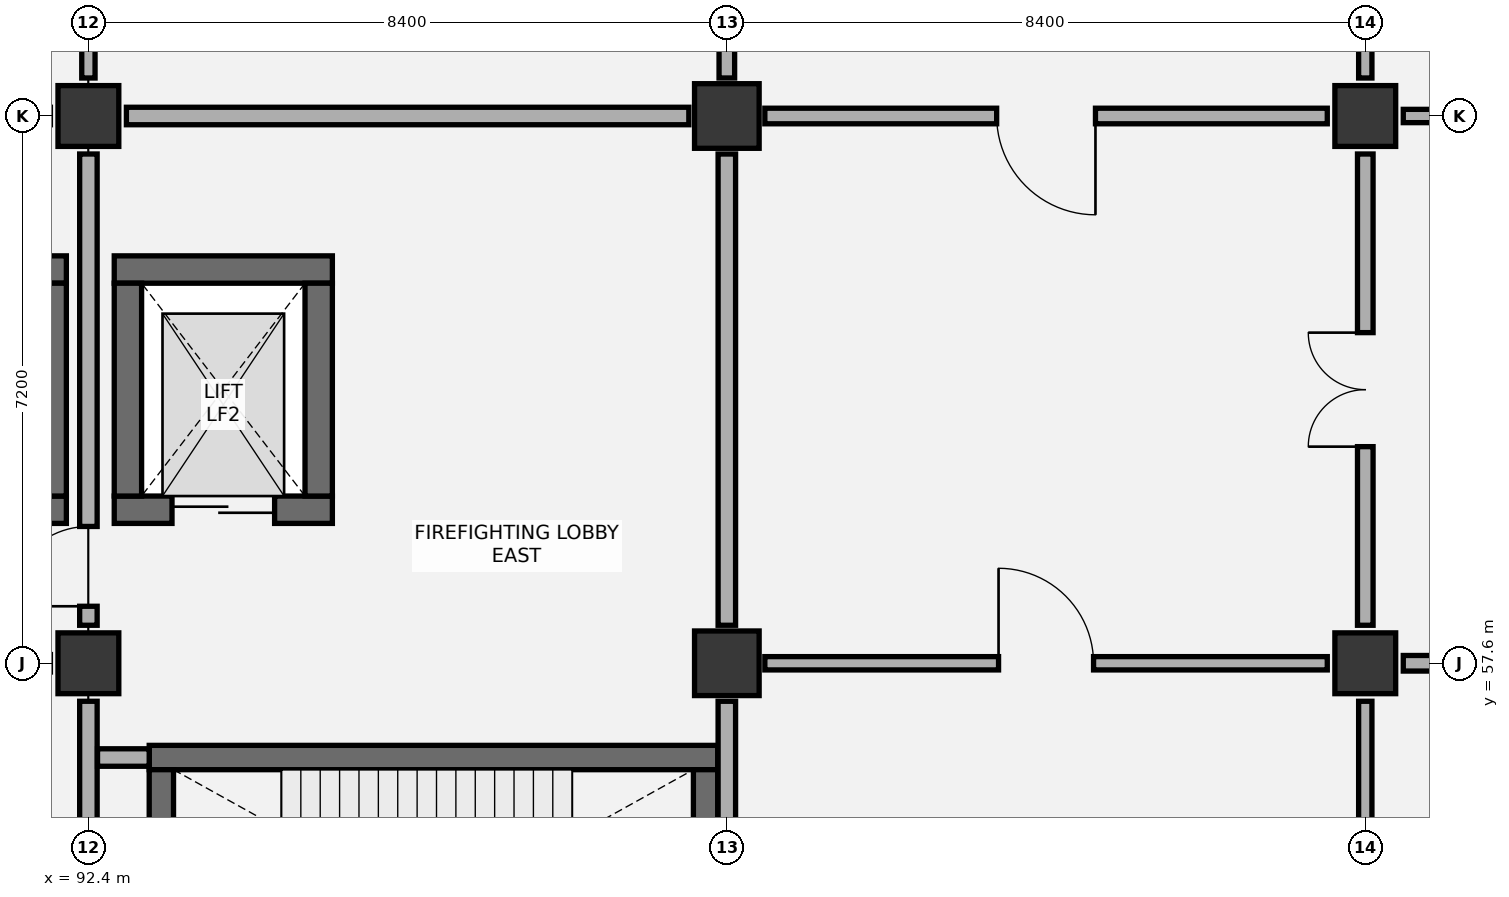
"""IFC4 building model, lengths in metres.
Left out: names, types, materials, properties, quantities, classifications, styles, units other than length and angle.
Written with IfcOpenShell. Run it as: python <this file> out.ifc"""

import sys

from ifc_helpers import new_model, si_unit, direction, frame, frame_2d, origin, origin_2d, place, context, subcontext, project, spatial, rectangle, extrude, element, fill, save


model = new_model("IFC4")
c1 = context("Model", 3, precision=1e-05, world=origin(), true_north=direction((0.0, 1.0)))
c2 = subcontext(c1, "Body", "Model", "MODEL_VIEW")
j1 = project(units=[si_unit("LENGTHUNIT", "METRE"), si_unit("PLANEANGLEUNIT", "RADIAN")], contexts=[c1])
p1 = place(None, origin())
s1 = spatial("IfcSite", under=j1, at=p1, CompositionType="ELEMENT")
p2 = place(p1, origin())
s2 = spatial("IfcBuilding", under=s1, at=p2, CompositionType="ELEMENT")
p3 = place(p2, frame((0.0, 0.0, 16.8)))
s3 = spatial("IfcBuildingStorey", under=s2, at=p3, CompositionType="ELEMENT", Elevation=16.8)
for number, where, z_axis, x_axis in (
    (1, (92.4, 57.6, 0.0), (0.0, 0.0, 1.0), (1.0, 0.0, 0.0)),
    (2, (92.4, 64.8, 0.0), (0.0, 0.0, 1.0), (1.0, 0.0, 0.0)),
):
    element("IfcColumn", number, at=place(p3, frame(where, z_axis=z_axis, x_axis=x_axis)), inside=s3, PredefinedType="COLUMN", context=c2, shape_type="SweptSolid", body=[
        extrude(rectangle(XDim=0.8, YDim=0.8, at=origin_2d()), origin(), (0.0, 0.0, 1.0), 5.4),
    ])
for number, where, z_axis, x_axis in (
    (3, (100.8, 57.6, 0.0), (0.0, 0.0, 1.0), (1.0, 0.0, 0.0)),
    (4, (100.8, 64.8, 0.0), (0.0, 0.0, 1.0), (1.0, 0.0, 0.0)),
):
    element("IfcColumn", number, at=place(p3, frame(where, z_axis=z_axis, x_axis=x_axis)), inside=s3, PredefinedType="COLUMN", context=c2, shape_type="SweptSolid", body=[
        extrude(rectangle(XDim=0.85, YDim=0.85, at=origin_2d()), origin(), (0.0, 0.0, 1.0), 5.4),
    ])
for number, where, z_axis, x_axis in (
    (5, (109.2, 57.6, 0.0), (0.0, 0.0, 1.0), (1.0, 0.0, 0.0)),
    (6, (109.2, 64.8, 0.0), (0.0, 0.0, 1.0), (1.0, 0.0, 0.0)),
):
    element("IfcColumn", number, at=place(p3, frame(where, z_axis=z_axis, x_axis=x_axis)), inside=s3, PredefinedType="COLUMN", context=c2, shape_type="SweptSolid", body=[
        extrude(rectangle(XDim=0.8, YDim=0.8, at=origin_2d()), origin(), (0.0, 0.0, 1.0), 5.4),
    ])
p4 = place(p3, frame((93.2, 56.36, 0.0), z_axis=(0.0, 0.0, 1.0), x_axis=(1.0, 0.0, 0.0)))
e7 = element("IfcWall", 7, at=p4, inside=s3, PredefinedType="SHEAR", context=c2, shape_type="SweptSolid", body=[
    extrude(rectangle(XDim=7.48, YDim=0.32, at=frame_2d((3.74, 0.0))), origin(), (0.0, 0.0, 1.0), 4.95),
])
for number, where, z_axis, x_axis in (
    (8, (93.36, 52.4, 0.0), (0.0, 0.0, 1.0), (0.0, 1.0, 0.0)),
    (9, (100.52, 52.4, 0.0), (0.0, 0.0, 1.0), (0.0, 1.0, 0.0)),
):
    element("IfcWall", number, at=place(p3, frame(where, z_axis=z_axis, x_axis=x_axis)), inside=s3, PredefinedType="SHEAR", context=c2, shape_type="SweptSolid", body=[
        extrude(rectangle(XDim=3.8, YDim=0.32, at=frame_2d((1.9, 0.0))), origin(), (0.0, 0.0, 1.0), 4.95),
    ])
p5 = place(p3, frame((84.34, 62.78, 0.0), z_axis=(0.0, 0.0, 1.0), x_axis=(1.0, 0.0, 0.0)))
e10 = element("IfcWall", 10, at=p5, inside=s3, PredefinedType="SHEAR", context=c2, shape_type="SweptSolid", body=[
    extrude(rectangle(XDim=7.77, YDim=0.36, at=frame_2d((3.885, 0.0))), origin(), (0.0, 0.0, 1.0), 4.95),
])
p6 = place(p3, frame((89.45, 59.62, 0.0), z_axis=(0.0, 0.0, 1.0), x_axis=(1.0, 0.0, 0.0)))
e11 = element("IfcWall", 11, at=p6, inside=s3, PredefinedType="SHEAR", context=c2, shape_type="SweptSolid", body=[
    extrude(rectangle(XDim=2.66, YDim=0.36, at=frame_2d((1.33, 0.0))), origin(), (0.0, 0.0, 1.0), 4.95),
])
p7 = place(p6, frame((0.78, 0.0, 0.0)))
e12 = element("IfcOpeningElement", 12, at=p7, cuts=e11, PredefinedType="OPENING", context=c2, shape_type="SweptSolid", body=[
    extrude(rectangle(XDim=1.1, YDim=2.15, at=frame_2d((0.55, 1.075))), frame((0.0, 0.19, 0.0), z_axis=(0.0, -1.0, 0.0), x_axis=(1.0, 0.0, 0.0)), (0.0, 0.0, 1.0), 0.38),
])
p8 = place(p3, frame((91.93, 59.8, 0.0), z_axis=(0.0, 0.0, 1.0), x_axis=(0.0, 1.0, 0.0)))
e13 = element("IfcWall", 13, at=p8, inside=s3, PredefinedType="SHEAR", context=c2, shape_type="SweptSolid", body=[
    extrude(rectangle(XDim=2.8, YDim=0.36, at=frame_2d((1.4, 0.0))), origin(), (0.0, 0.0, 1.0), 4.95),
])
p9 = place(p3, frame((92.74, 62.78, 0.0), z_axis=(0.0, 0.0, 1.0), x_axis=(1.0, 0.0, 0.0)))
e14 = element("IfcWall", 14, at=p9, inside=s3, PredefinedType="SHEAR", context=c2, shape_type="SweptSolid", body=[
    extrude(rectangle(XDim=2.87, YDim=0.36, at=frame_2d((1.435, 0.0))), origin(), (0.0, 0.0, 1.0), 4.95),
])
p10 = place(p3, frame((92.74, 59.62, 0.0), z_axis=(0.0, 0.0, 1.0), x_axis=(1.0, 0.0, 0.0)))
e15 = element("IfcWall", 15, at=p10, inside=s3, PredefinedType="SHEAR", context=c2, shape_type="SweptSolid", body=[
    extrude(rectangle(XDim=2.87, YDim=0.36, at=frame_2d((1.435, 0.0))), origin(), (0.0, 0.0, 1.0), 4.95),
])
p11 = place(p10, frame((0.76, 0.0, 0.0)))
e16 = element("IfcOpeningElement", 16, at=p11, cuts=e15, PredefinedType="OPENING", context=c2, shape_type="SweptSolid", body=[
    extrude(rectangle(XDim=1.35, YDim=2.2, at=frame_2d((0.675, 1.1))), frame((0.0, 0.19, 0.0), z_axis=(0.0, -1.0, 0.0), x_axis=(1.0, 0.0, 0.0)), (0.0, 0.0, 1.0), 0.38),
])
for number, where, z_axis, x_axis in (
    (17, (92.92, 59.8, 0.0), (0.0, 0.0, 1.0), (0.0, 1.0, 0.0)),
    (18, (95.43, 59.8, 0.0), (0.0, 0.0, 1.0), (0.0, 1.0, 0.0)),
):
    element("IfcWall", number, at=place(p3, frame(where, z_axis=z_axis, x_axis=x_axis)), inside=s3, PredefinedType="SHEAR", context=c2, shape_type="SweptSolid", body=[
        extrude(rectangle(XDim=2.8, YDim=0.36, at=frame_2d((1.4, 0.0))), origin(), (0.0, 0.0, 1.0), 4.95),
    ])
p12 = place(p3, frame((92.4, 50.9, 0.0), z_axis=(0.0, 0.0, 1.0), x_axis=(0.0, 1.0, 0.0)))
e19 = element("IfcWall", 19, at=p12, inside=s3, PredefinedType="PARTITIONING", context=c2, shape_type="SweptSolid", body=[
    extrude(rectangle(XDim=6.2, YDim=0.23, at=frame_2d((3.1, 0.0))), origin(), (0.0, 0.0, 1.0), 4.245),
])
p13 = place(p12, frame((0.05, 0.0, 0.0)))
e20 = element("IfcOpeningElement", 20, at=p13, cuts=e19, PredefinedType="OPENING", context=c2, shape_type="SweptSolid", body=[
    extrude(rectangle(XDim=1.05, YDim=2.15, at=frame_2d((0.525, 1.075))), frame((0.0, 0.125, 0.0), z_axis=(0.0, -1.0, 0.0), x_axis=(1.0, 0.0, 0.0)), (0.0, 0.0, 1.0), 0.25),
])
p14 = place(p3, frame((92.4, 58.1, 0.0), z_axis=(0.0, 0.0, 1.0), x_axis=(0.0, 1.0, 0.0)))
e21 = element("IfcWall", 21, at=p14, inside=s3, PredefinedType="PARTITIONING", context=c2, shape_type="SweptSolid", body=[
    extrude(rectangle(XDim=6.2, YDim=0.23, at=frame_2d((3.1, 0.0))), origin(), (0.0, 0.0, 1.0), 4.445),
])
p15 = place(p14, frame((0.25, 0.0, 0.0)))
e22 = element("IfcOpeningElement", 22, at=p15, cuts=e21, PredefinedType="OPENING", context=c2, shape_type="SweptSolid", body=[
    extrude(rectangle(XDim=1.05, YDim=2.15, at=frame_2d((0.525, 1.075))), frame((0.0, 0.125, 0.0), z_axis=(0.0, -1.0, 0.0), x_axis=(1.0, 0.0, 0.0)), (0.0, 0.0, 1.0), 0.25),
])
p16 = place(p3, frame((92.4, 65.3, 0.0), z_axis=(0.0, 0.0, 1.0), x_axis=(0.0, 1.0, 0.0)))
e23 = element("IfcWall", 23, at=p16, inside=s3, PredefinedType="PARTITIONING", context=c2, shape_type="SweptSolid", body=[
    extrude(rectangle(XDim=6.2, YDim=0.175, at=frame_2d((3.1, 0.0))), origin(), (0.0, 0.0, 1.0), 4.245),
])
p17 = place(p16, frame((2.475, 0.0, 0.0)))
e24 = element("IfcOpeningElement", 24, at=p17, cuts=e23, PredefinedType="OPENING", context=c2, shape_type="SweptSolid", body=[
    extrude(rectangle(XDim=1.25, YDim=2.1, at=frame_2d((0.625, 1.05))), frame((0.0, 0.097, 0.0), z_axis=(0.0, -1.0, 0.0), x_axis=(1.0, 0.0, 0.0)), (0.0, 0.0, 1.0), 0.195),
])
p18 = place(p3, frame((100.8, 50.9, 0.0), z_axis=(0.0, 0.0, 1.0), x_axis=(0.0, 1.0, 0.0)))
e25 = element("IfcWall", 25, at=p18, inside=s3, PredefinedType="PARTITIONING", context=c2, shape_type="SweptSolid", body=[
    extrude(rectangle(XDim=6.2, YDim=0.23, at=frame_2d((3.1, 0.0))), origin(), (0.0, 0.0, 1.0), 4.445),
])
p19 = place(p3, frame((92.52, 56.36, 0.0), z_axis=(0.0, 0.0, 1.0), x_axis=(1.0, 0.0, 0.0)))
e26 = element("IfcWall", 26, at=p19, inside=s3, PredefinedType="PARTITIONING", context=c2, shape_type="SweptSolid", body=[
    extrude(rectangle(XDim=0.68, YDim=0.23, at=frame_2d((0.34, 0.0))), origin(), (0.0, 0.0, 1.0), 4.95),
])
p20 = place(p3, frame((100.8, 58.1, 0.0), z_axis=(0.0, 0.0, 1.0), x_axis=(0.0, 1.0, 0.0)))
e27 = element("IfcWall", 27, at=p20, inside=s3, PredefinedType="PARTITIONING", context=c2, shape_type="SweptSolid", body=[
    extrude(rectangle(XDim=6.2, YDim=0.23, at=frame_2d((3.1, 0.0))), origin(), (0.0, 0.0, 1.0), 4.245),
])
p21 = place(p3, frame((92.9, 64.8, 0.0), z_axis=(0.0, 0.0, 1.0), x_axis=(1.0, 0.0, 0.0)))
e28 = element("IfcWall", 28, at=p21, inside=s3, PredefinedType="PARTITIONING", context=c2, shape_type="SweptSolid", body=[
    extrude(rectangle(XDim=7.4, YDim=0.23, at=frame_2d((3.7, 0.0))), origin(), (0.0, 0.0, 1.0), 4.195),
])
p22 = place(p3, frame((100.8, 65.3, 0.0), z_axis=(0.0, 0.0, 1.0), x_axis=(0.0, 1.0, 0.0)))
e29 = element("IfcWall", 29, at=p22, inside=s3, PredefinedType="PARTITIONING", context=c2, shape_type="SweptSolid", body=[
    extrude(rectangle(XDim=6.2, YDim=0.205, at=frame_2d((3.1, 0.0))), origin(), (0.0, 0.0, 1.0), 4.545),
])
p23 = place(p3, frame((109.2, 50.9, 0.0), z_axis=(0.0, 0.0, 1.0), x_axis=(0.0, 1.0, 0.0)))
e30 = element("IfcWall", 30, at=p23, inside=s3, PredefinedType="PARTITIONING", context=c2, shape_type="SweptSolid", body=[
    extrude(rectangle(XDim=6.2, YDim=0.175, at=frame_2d((3.1, 0.0))), origin(), (0.0, 0.0, 1.0), 4.245),
])
p24 = place(p3, frame((101.3, 57.6, 0.0), z_axis=(0.0, 0.0, 1.0), x_axis=(1.0, 0.0, 0.0)))
e31 = element("IfcWall", 31, at=p24, inside=s3, PredefinedType="PARTITIONING", context=c2, shape_type="SweptSolid", body=[
    extrude(rectangle(XDim=7.4, YDim=0.175, at=frame_2d((3.7, 0.0))), origin(), (0.0, 0.0, 1.0), 4.195),
])
p25 = place(p24, frame((3.075, 0.0, 0.0)))
e32 = element("IfcOpeningElement", 32, at=p25, cuts=e31, PredefinedType="OPENING", context=c2, shape_type="SweptSolid", body=[
    extrude(rectangle(XDim=1.25, YDim=2.1, at=frame_2d((0.625, 1.05))), frame((0.0, 0.097, 0.0), z_axis=(0.0, -1.0, 0.0), x_axis=(1.0, 0.0, 0.0)), (0.0, 0.0, 1.0), 0.195),
])
p26 = place(p3, frame((109.2, 58.1, 0.0), z_axis=(0.0, 0.0, 1.0), x_axis=(0.0, 1.0, 0.0)))
e33 = element("IfcWall", 33, at=p26, inside=s3, PredefinedType="PARTITIONING", context=c2, shape_type="SweptSolid", body=[
    extrude(rectangle(XDim=6.2, YDim=0.205, at=frame_2d((3.1, 0.0))), origin(), (0.0, 0.0, 1.0), 4.545),
])
p27 = place(p26, frame((2.35, 0.0, 0.0)))
e34 = element("IfcOpeningElement", 34, at=p27, cuts=e33, PredefinedType="OPENING", context=c2, shape_type="SweptSolid", body=[
    extrude(rectangle(XDim=1.5, YDim=2.2, at=frame_2d((0.75, 1.1))), frame((0.0, 0.113, 0.0), z_axis=(0.0, -1.0, 0.0), x_axis=(1.0, 0.0, 0.0)), (0.0, 0.0, 1.0), 0.225),
])
p28 = place(p3, frame((101.3, 64.8, 0.0), z_axis=(0.0, 0.0, 1.0), x_axis=(1.0, 0.0, 0.0)))
e35 = element("IfcWall", 35, at=p28, inside=s3, PredefinedType="PARTITIONING", context=c2, shape_type="SweptSolid", body=[
    extrude(rectangle(XDim=7.4, YDim=0.205, at=frame_2d((3.7, 0.0))), origin(), (0.0, 0.0, 1.0), 4.195),
])
p29 = place(p28, frame((3.05, 0.0, 0.0)))
e36 = element("IfcOpeningElement", 36, at=p29, cuts=e35, PredefinedType="OPENING", context=c2, shape_type="SweptSolid", body=[
    extrude(rectangle(XDim=1.3, YDim=2.15, at=frame_2d((0.65, 1.075))), frame((0.0, 0.113, 0.0), z_axis=(0.0, -1.0, 0.0), x_axis=(1.0, 0.0, 0.0)), (0.0, 0.0, 1.0), 0.225),
])
p30 = place(p3, frame((109.2, 65.3, 0.0), z_axis=(0.0, 0.0, 1.0), x_axis=(0.0, 1.0, 0.0)))
e37 = element("IfcWall", 37, at=p30, inside=s3, PredefinedType="PARTITIONING", context=c2, shape_type="SweptSolid", body=[
    extrude(rectangle(XDim=6.2, YDim=0.175, at=frame_2d((3.1, 0.0))), origin(), (0.0, 0.0, 1.0), 4.245),
])
p31 = place(p3, frame((109.7, 57.6, 0.0), z_axis=(0.0, 0.0, 1.0), x_axis=(1.0, 0.0, 0.0)))
e38 = element("IfcWall", 38, at=p31, inside=s3, PredefinedType="PARTITIONING", context=c2, shape_type="SweptSolid", body=[
    extrude(rectangle(XDim=7.4, YDim=0.205, at=frame_2d((3.7, 0.0))), origin(), (0.0, 0.0, 1.0), 4.195),
])
p32 = place(p31, frame((3.025, 0.0, 0.0)))
e39 = element("IfcOpeningElement", 39, at=p32, cuts=e38, PredefinedType="OPENING", context=c2, shape_type="SweptSolid", body=[
    extrude(rectangle(XDim=1.35, YDim=2.15, at=frame_2d((0.675, 1.075))), frame((0.0, 0.113, 0.0), z_axis=(0.0, -1.0, 0.0), x_axis=(1.0, 0.0, 0.0)), (0.0, 0.0, 1.0), 0.225),
])
p33 = place(p3, frame((109.7, 64.8, 0.0), z_axis=(0.0, 0.0, 1.0), x_axis=(1.0, 0.0, 0.0)))
e40 = element("IfcWall", 40, at=p33, inside=s3, PredefinedType="PARTITIONING", context=c2, shape_type="SweptSolid", body=[
    extrude(rectangle(XDim=7.4, YDim=0.175, at=frame_2d((3.7, 0.0))), origin(), (0.0, 0.0, 1.0), 4.195),
])
p34 = place(p33, frame((3.075, 0.0, 0.0)))
e41 = element("IfcOpeningElement", 41, at=p34, cuts=e40, PredefinedType="OPENING", context=c2, shape_type="SweptSolid", body=[
    extrude(rectangle(XDim=1.25, YDim=2.1, at=frame_2d((0.625, 1.05))), frame((0.0, 0.097, 0.0), z_axis=(0.0, -1.0, 0.0), x_axis=(1.0, 0.0, 0.0)), (0.0, 0.0, 1.0), 0.195),
])
p35 = place(p11, origin())
e42 = element("IfcDoor", 42, at=p35, inside=s3, OperationType="DOUBLE_DOOR_SLIDING", PredefinedType="DOOR", context=c2, shape_type="SweptSolid", body=[
    extrude(rectangle(XDim=1.35, YDim=2.2, at=frame_2d((0.675, 1.1))), frame((0.0, 0.025, 0.0), z_axis=(0.0, -1.0, 0.0), x_axis=(1.0, 0.0, 0.0)), (0.0, 0.0, 1.0), 0.05),
])
fill(e16, e42)
p36 = place(p15, origin())
e43 = element("IfcDoor", 43, at=p36, inside=s3, OperationType="SINGLE_SWING_LEFT", PredefinedType="DOOR", context=c2, shape_type="SweptSolid", body=[
    extrude(rectangle(XDim=1.05, YDim=2.15, at=frame_2d((0.525, 1.075))), frame((0.0, 0.025, 0.0), z_axis=(0.0, -1.0, 0.0), x_axis=(1.0, 0.0, 0.0)), (0.0, 0.0, 1.0), 0.05),
])
fill(e22, e43)
p37 = place(p25, origin())
e44 = element("IfcDoor", 44, at=p37, inside=s3, OperationType="SINGLE_SWING_LEFT", PredefinedType="DOOR", context=c2, shape_type="SweptSolid", body=[
    extrude(rectangle(XDim=1.25, YDim=2.1, at=frame_2d((0.625, 1.05))), frame((0.0, 0.025, 0.0), z_axis=(0.0, -1.0, 0.0), x_axis=(1.0, 0.0, 0.0)), (0.0, 0.0, 1.0), 0.05),
])
fill(e32, e44)
p38 = place(p27, origin())
e45 = element("IfcDoor", 45, at=p38, inside=s3, OperationType="DOUBLE_DOOR_SINGLE_SWING", PredefinedType="DOOR", context=c2, shape_type="SweptSolid", body=[
    extrude(rectangle(XDim=1.5, YDim=2.2, at=frame_2d((0.75, 1.1))), frame((0.0, 0.025, 0.0), z_axis=(0.0, -1.0, 0.0), x_axis=(1.0, 0.0, 0.0)), (0.0, 0.0, 1.0), 0.05),
])
fill(e34, e45)
p39 = place(p29, frame((1.3, 0.0, 0.0), z_axis=(0.0, 0.0, 1.0), x_axis=(-1.0, 0.0, 0.0)))
e46 = element("IfcDoor", 46, at=p39, inside=s3, OperationType="SINGLE_SWING_LEFT", PredefinedType="DOOR", context=c2, shape_type="SweptSolid", body=[
    extrude(rectangle(XDim=1.3, YDim=2.15, at=frame_2d((0.65, 1.075))), frame((0.0, 0.025, 0.0), z_axis=(0.0, -1.0, 0.0), x_axis=(1.0, 0.0, 0.0)), (0.0, 0.0, 1.0), 0.05),
])
fill(e36, e46)
save(model, sys.argv[1])
